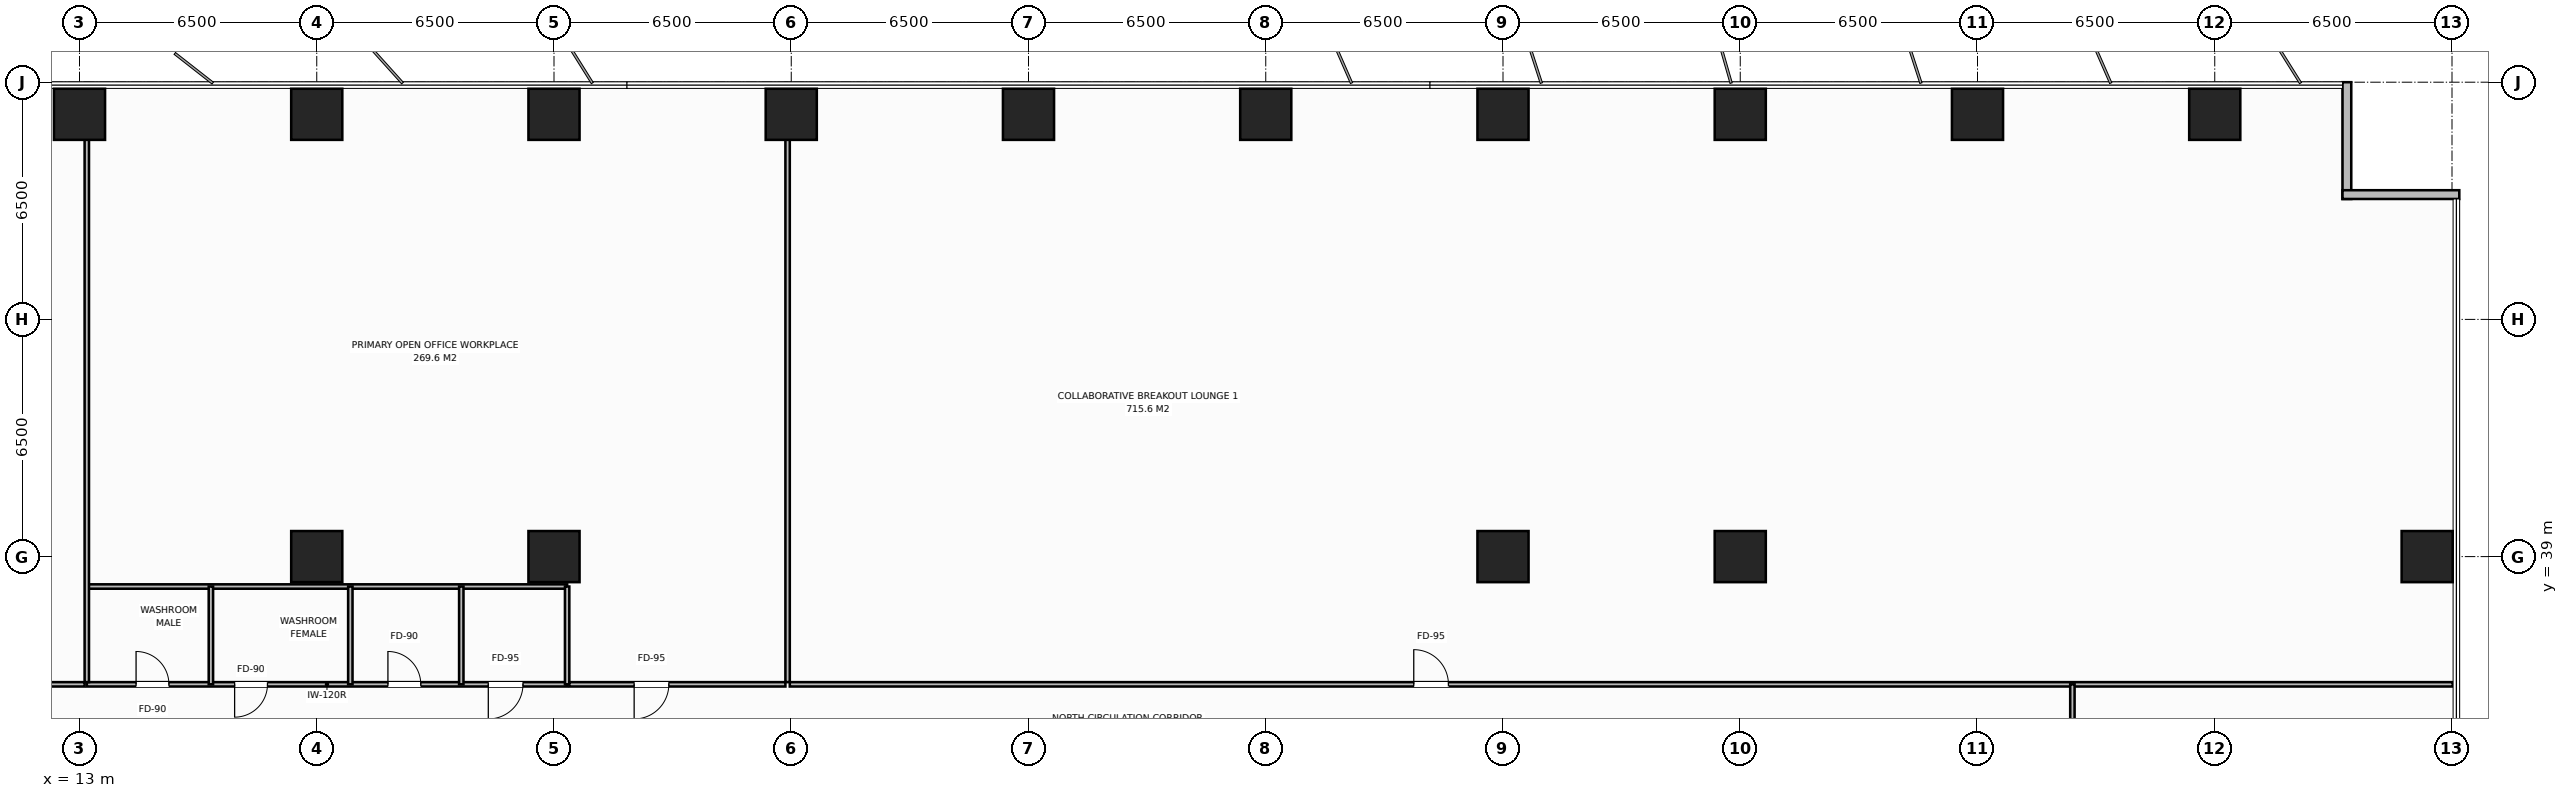
"""IFC4 building model, lengths in metres.
Left out: names, types, materials, properties, quantities, classifications, styles, units other than length and angle.
Written with IfcOpenShell. Run it as: python <this file> out.ifc"""

import sys

from ifc_helpers import new_model, si_unit, direction, frame, frame_2d, origin, origin_2d, place, context, subcontext, project, spatial, rectangle, extrude, element, fill, save


model = new_model("IFC4")
c1 = context("Model", 3, precision=1e-05, world=origin(), true_north=direction((0.0, 1.0)))
c2 = subcontext(c1, "Body", "Model", "MODEL_VIEW")
j1 = project(units=[si_unit("LENGTHUNIT", "METRE"), si_unit("PLANEANGLEUNIT", "RADIAN")], contexts=[c1])
p1 = place(None, origin())
s1 = spatial("IfcSite", under=j1, at=p1, CompositionType="ELEMENT")
p2 = place(p1, origin())
s2 = spatial("IfcBuilding", under=s1, at=p2, CompositionType="ELEMENT")
p3 = place(p2, frame((0.0, 0.0, 27.8)))
s3 = spatial("IfcBuildingStorey", under=s2, at=p3, CompositionType="ELEMENT", Elevation=27.8)
for number, where, z_axis, x_axis in (
    (1, (19.5, 39.0, 0.0), (0.0, 0.0, 1.0), (1.0, 0.0, 0.0)),
    (2, (58.5, 39.0, 0.0), (0.0, 0.0, 1.0), (1.0, 0.0, 0.0)),
    (3, (26.0, 39.0, 0.0), (0.0, 0.0, 1.0), (1.0, 0.0, 0.0)),
    (4, (52.0, 39.0, 0.0), (0.0, 0.0, 1.0), (1.0, 0.0, 0.0)),
    (5, (13.0, 51.12, 0.0), (0.0, 0.0, 1.0), (1.0, 0.0, 0.0)),
    (6, (19.5, 51.12, 0.0), (0.0, 0.0, 1.0), (1.0, 0.0, 0.0)),
    (7, (26.0, 51.12, 0.0), (0.0, 0.0, 1.0), (1.0, 0.0, 0.0)),
    (8, (32.5, 51.12, 0.0), (0.0, 0.0, 1.0), (1.0, 0.0, 0.0)),
    (9, (39.0, 51.12, 0.0), (0.0, 0.0, 1.0), (1.0, 0.0, 0.0)),
    (10, (45.5, 51.12, 0.0), (0.0, 0.0, 1.0), (1.0, 0.0, 0.0)),
    (11, (52.0, 51.12, 0.0), (0.0, 0.0, 1.0), (1.0, 0.0, 0.0)),
    (12, (58.5, 51.12, 0.0), (0.0, 0.0, 1.0), (1.0, 0.0, 0.0)),
    (13, (65.0, 51.12, 0.0), (0.0, 0.0, 1.0), (1.0, 0.0, 0.0)),
    (14, (71.5, 51.12, 0.0), (0.0, 0.0, 1.0), (1.0, 0.0, 0.0)),
    (15, (77.32, 39.0, 0.0), (0.0, 0.0, 1.0), (1.0, 0.0, 0.0)),
):
    element("IfcColumn", number, at=place(p3, frame(where, z_axis=z_axis, x_axis=x_axis)), inside=s3, PredefinedType="COLUMN", context=c2, shape_type="SweptSolid", body=[
        extrude(rectangle(XDim=1.4, YDim=1.4, at=origin_2d()), origin(), (0.0, 0.0, 1.0), 3.8),
    ])
for number, where, z_axis, x_axis in (
    (16, (75.12, 52.0, 0.0), (0.0, 0.0, 1.0), (0.0, -1.0, 0.0)),
    (17, (75.0, 48.92, 0.0), (0.0, 0.0, 1.0), (1.0, 0.0, 0.0)),
):
    element("IfcWall", number, at=place(p3, frame(where, z_axis=z_axis, x_axis=x_axis)), inside=s3, PredefinedType="STANDARD", context=c2, shape_type="SweptSolid", body=[
        extrude(rectangle(XDim=3.2, YDim=0.24, at=frame_2d((1.6, 0.0))), origin(), (0.0, 0.0, 1.0), 3.55),
    ])
p4 = place(p3, frame((13.2, 35.5, 0.0), z_axis=(0.0, 0.0, 1.0), x_axis=(1.0, 0.0, 0.0)))
e18 = element("IfcWall", 18, at=p4, inside=s3, PredefinedType="PARTITIONING", context=c2, shape_type="SweptSolid", body=[
    extrude(rectangle(XDim=13.16, YDim=0.12, at=frame_2d((6.58, 0.0))), origin(), (0.0, 0.0, 1.0), 3.55),
])
p5 = place(p4, frame((1.35, 0.0, 0.0)))
e19 = element("IfcOpeningElement", 19, at=p5, cuts=e18, PredefinedType="OPENING", context=c2, shape_type="SweptSolid", body=[
    extrude(rectangle(XDim=0.9, YDim=2.15, at=frame_2d((0.45, 1.075))), frame((0.0, 0.07, 0.0), z_axis=(0.0, -1.0, 0.0), x_axis=(1.0, 0.0, 0.0)), (0.0, 0.0, 1.0), 0.14),
])
p6 = place(p4, frame((4.05, 0.0, 0.0)))
e20 = element("IfcOpeningElement", 20, at=p6, cuts=e18, PredefinedType="OPENING", context=c2, shape_type="SweptSolid", body=[
    extrude(rectangle(XDim=0.9, YDim=2.15, at=frame_2d((0.45, 1.075))), frame((0.0, 0.07, 0.0), z_axis=(0.0, -1.0, 0.0), x_axis=(1.0, 0.0, 0.0)), (0.0, 0.0, 1.0), 0.14),
])
p7 = place(p4, frame((8.25, 0.0, 0.0)))
e21 = element("IfcOpeningElement", 21, at=p7, cuts=e18, PredefinedType="OPENING", context=c2, shape_type="SweptSolid", body=[
    extrude(rectangle(XDim=0.9, YDim=2.15, at=frame_2d((0.45, 1.075))), frame((0.0, 0.07, 0.0), z_axis=(0.0, -1.0, 0.0), x_axis=(1.0, 0.0, 0.0)), (0.0, 0.0, 1.0), 0.14),
])
p8 = place(p4, frame((11.0, 0.0, 0.0)))
e22 = element("IfcOpeningElement", 22, at=p8, cuts=e18, PredefinedType="OPENING", context=c2, shape_type="SweptSolid", body=[
    extrude(rectangle(XDim=0.95, YDim=2.15, at=frame_2d((0.475, 1.075))), frame((0.0, 0.07, 0.0), z_axis=(0.0, -1.0, 0.0), x_axis=(1.0, 0.0, 0.0)), (0.0, 0.0, 1.0), 0.14),
])
p9 = place(p3, frame((13.2, 38.18, 0.0), z_axis=(0.0, 0.0, 1.0), x_axis=(1.0, 0.0, 0.0)))
e23 = element("IfcWall", 23, at=p9, inside=s3, PredefinedType="PARTITIONING", context=c2, shape_type="SweptSolid", body=[
    extrude(rectangle(XDim=13.16, YDim=0.12, at=frame_2d((6.58, 0.0))), origin(), (0.0, 0.0, 1.0), 3.55),
])
for number, where, z_axis, x_axis in (
    (24, (16.6, 35.5, 0.0), (0.0, 0.0, 1.0), (0.0, 1.0, 0.0)),
    (25, (20.42, 35.5, 0.0), (0.0, 0.0, 1.0), (0.0, 1.0, 0.0)),
    (26, (23.46, 35.5, 0.0), (0.0, 0.0, 1.0), (0.0, 1.0, 0.0)),
    (27, (26.36, 35.5, 0.0), (0.0, 0.0, 1.0), (0.0, 1.0, 0.0)),
):
    element("IfcWall", number, at=place(p3, frame(where, z_axis=z_axis, x_axis=x_axis)), inside=s3, PredefinedType="PARTITIONING", context=c2, shape_type="SweptSolid", body=[
        extrude(rectangle(XDim=2.68, YDim=0.12, at=frame_2d((1.34, 0.0))), origin(), (0.0, 0.0, 1.0), 3.55),
    ])
p10 = place(p3, frame((13.2, 35.56, 0.0), z_axis=(0.0, 0.0, 1.0), x_axis=(0.0, 1.0, 0.0)))
e28 = element("IfcWall", 28, at=p10, inside=s3, PredefinedType="PARTITIONING", context=c2, shape_type="SweptSolid", body=[
    extrude(rectangle(XDim=16.42, YDim=0.12, at=frame_2d((8.21, 0.0))), origin(), (0.0, 0.0, 1.0), 2.9),
])
p11 = place(p3, frame((-0.02, 35.5, 0.0), z_axis=(0.0, 0.0, 1.0), x_axis=(1.0, 0.0, 0.0)))
e29 = element("IfcWall", 29, at=p11, inside=s3, PredefinedType="PARTITIONING", context=c2, shape_type="SweptSolid", body=[
    extrude(rectangle(XDim=13.16, YDim=0.12, at=frame_2d((6.58, 0.0))), origin(), (0.0, 0.0, 1.0), 3.55),
])
p12 = place(p11, frame((10.9, 0.0, 0.0)))
e30 = element("IfcOpeningElement", 30, at=p12, cuts=e29, PredefinedType="OPENING", context=c2, shape_type="SweptSolid", body=[
    extrude(rectangle(XDim=0.95, YDim=2.15, at=frame_2d((0.475, 1.075))), frame((0.0, 0.07, 0.0), z_axis=(0.0, -1.0, 0.0), x_axis=(1.0, 0.0, 0.0)), (0.0, 0.0, 1.0), 0.14),
])
p13 = place(p3, frame((32.4, 35.56, 0.0), z_axis=(0.0, 0.0, 1.0), x_axis=(0.0, 1.0, 0.0)))
e31 = element("IfcWall", 31, at=p13, inside=s3, PredefinedType="PARTITIONING", context=c2, shape_type="SweptSolid", body=[
    extrude(rectangle(XDim=16.42, YDim=0.12, at=frame_2d((8.21, 0.0))), origin(), (0.0, 0.0, 1.0), 2.9),
])
p14 = place(p3, frame((26.42, 35.5, 0.0), z_axis=(0.0, 0.0, 1.0), x_axis=(1.0, 0.0, 0.0)))
e32 = element("IfcWall", 32, at=p14, inside=s3, PredefinedType="PARTITIONING", context=c2, shape_type="SweptSolid", body=[
    extrude(rectangle(XDim=5.92, YDim=0.12, at=frame_2d((2.96, 0.0))), origin(), (0.0, 0.0, 1.0), 3.55),
])
p15 = place(p14, frame((1.776, 0.0, 0.0)))
e33 = element("IfcOpeningElement", 33, at=p15, cuts=e32, PredefinedType="OPENING", context=c2, shape_type="SweptSolid", body=[
    extrude(rectangle(XDim=0.95, YDim=2.15, at=frame_2d((0.475, 1.075))), frame((0.0, 0.07, 0.0), z_axis=(0.0, -1.0, 0.0), x_axis=(1.0, 0.0, 0.0)), (0.0, 0.0, 1.0), 0.14),
])
p16 = place(p3, frame((32.46, 35.5, 0.0), z_axis=(0.0, 0.0, 1.0), x_axis=(1.0, 0.0, 0.0)))
e34 = element("IfcWall", 34, at=p16, inside=s3, PredefinedType="PARTITIONING", context=c2, shape_type="SweptSolid", body=[
    extrude(rectangle(XDim=45.56, YDim=0.12, at=frame_2d((22.78, 0.0))), origin(), (0.0, 0.0, 1.0), 3.55),
])
p17 = place(p16, frame((17.095, 0.0, 0.0)))
e35 = element("IfcOpeningElement", 35, at=p17, cuts=e34, PredefinedType="OPENING", context=c2, shape_type="SweptSolid", body=[
    extrude(rectangle(XDim=0.95, YDim=2.15, at=frame_2d((0.475, 1.075))), frame((0.0, 0.07, 0.0), z_axis=(0.0, -1.0, 0.0), x_axis=(1.0, 0.0, 0.0)), (0.0, 0.0, 1.0), 0.14),
])
p18 = place(p3, frame((67.6, 26.0, 0.0), z_axis=(0.0, 0.0, 1.0), x_axis=(0.0, 1.0, 0.0)))
e36 = element("IfcWall", 36, at=p18, inside=s3, PredefinedType="PARTITIONING", context=c2, shape_type="SweptSolid", body=[
    extrude(rectangle(XDim=9.5, YDim=0.12, at=frame_2d((4.75, 0.0))), origin(), (0.0, 0.0, 1.0), 3.55),
])
p19 = place(p18, frame((3.225, 0.0, 0.0)))
e37 = element("IfcOpeningElement", 37, at=p19, cuts=e36, PredefinedType="OPENING", context=c2, shape_type="SweptSolid", body=[
    extrude(rectangle(XDim=0.95, YDim=2.15, at=frame_2d((0.475, 1.075))), frame((0.0, 0.07, 0.0), z_axis=(0.0, -1.0, 0.0), x_axis=(1.0, 0.0, 0.0)), (0.0, 0.0, 1.0), 0.14),
])
p20 = place(p5, origin())
e38 = element("IfcDoor", 38, at=p20, inside=s3, OperationType="SINGLE_SWING_LEFT", PredefinedType="DOOR", context=c2, shape_type="SweptSolid", body=[
    extrude(rectangle(XDim=0.9, YDim=2.15, at=frame_2d((0.45, 1.075))), frame((0.0, 0.025, 0.0), z_axis=(0.0, -1.0, 0.0), x_axis=(1.0, 0.0, 0.0)), (0.0, 0.0, 1.0), 0.05),
])
fill(e19, e38)
p21 = place(p6, origin())
e39 = element("IfcDoor", 39, at=p21, inside=s3, OperationType="SINGLE_SWING_RIGHT", PredefinedType="DOOR", context=c2, shape_type="SweptSolid", body=[
    extrude(rectangle(XDim=0.9, YDim=2.15, at=frame_2d((0.45, 1.075))), frame((0.0, 0.025, 0.0), z_axis=(0.0, -1.0, 0.0), x_axis=(1.0, 0.0, 0.0)), (0.0, 0.0, 1.0), 0.05),
])
fill(e20, e39)
p22 = place(p7, origin())
e40 = element("IfcDoor", 40, at=p22, inside=s3, OperationType="SINGLE_SWING_LEFT", PredefinedType="DOOR", context=c2, shape_type="SweptSolid", body=[
    extrude(rectangle(XDim=0.9, YDim=2.15, at=frame_2d((0.45, 1.075))), frame((0.0, 0.025, 0.0), z_axis=(0.0, -1.0, 0.0), x_axis=(1.0, 0.0, 0.0)), (0.0, 0.0, 1.0), 0.05),
])
fill(e21, e40)
p23 = place(p8, origin())
e41 = element("IfcDoor", 41, at=p23, inside=s3, OperationType="SINGLE_SWING_RIGHT", PredefinedType="DOOR", context=c2, shape_type="SweptSolid", body=[
    extrude(rectangle(XDim=0.95, YDim=2.15, at=frame_2d((0.475, 1.075))), frame((0.0, 0.025, 0.0), z_axis=(0.0, -1.0, 0.0), x_axis=(1.0, 0.0, 0.0)), (0.0, 0.0, 1.0), 0.05),
])
fill(e22, e41)
p24 = place(p15, origin())
e42 = element("IfcDoor", 42, at=p24, inside=s3, OperationType="SINGLE_SWING_RIGHT", PredefinedType="DOOR", context=c2, shape_type="SweptSolid", body=[
    extrude(rectangle(XDim=0.95, YDim=2.15, at=frame_2d((0.475, 1.075))), frame((0.0, 0.025, 0.0), z_axis=(0.0, -1.0, 0.0), x_axis=(1.0, 0.0, 0.0)), (0.0, 0.0, 1.0), 0.05),
])
fill(e33, e42)
p25 = place(p17, origin())
e43 = element("IfcDoor", 43, at=p25, inside=s3, OperationType="SINGLE_SWING_LEFT", PredefinedType="DOOR", context=c2, shape_type="SweptSolid", body=[
    extrude(rectangle(XDim=0.95, YDim=2.15, at=frame_2d((0.475, 1.075))), frame((0.0, 0.025, 0.0), z_axis=(0.0, -1.0, 0.0), x_axis=(1.0, 0.0, 0.0)), (0.0, 0.0, 1.0), 0.05),
])
fill(e35, e43)
save(model, sys.argv[1])
